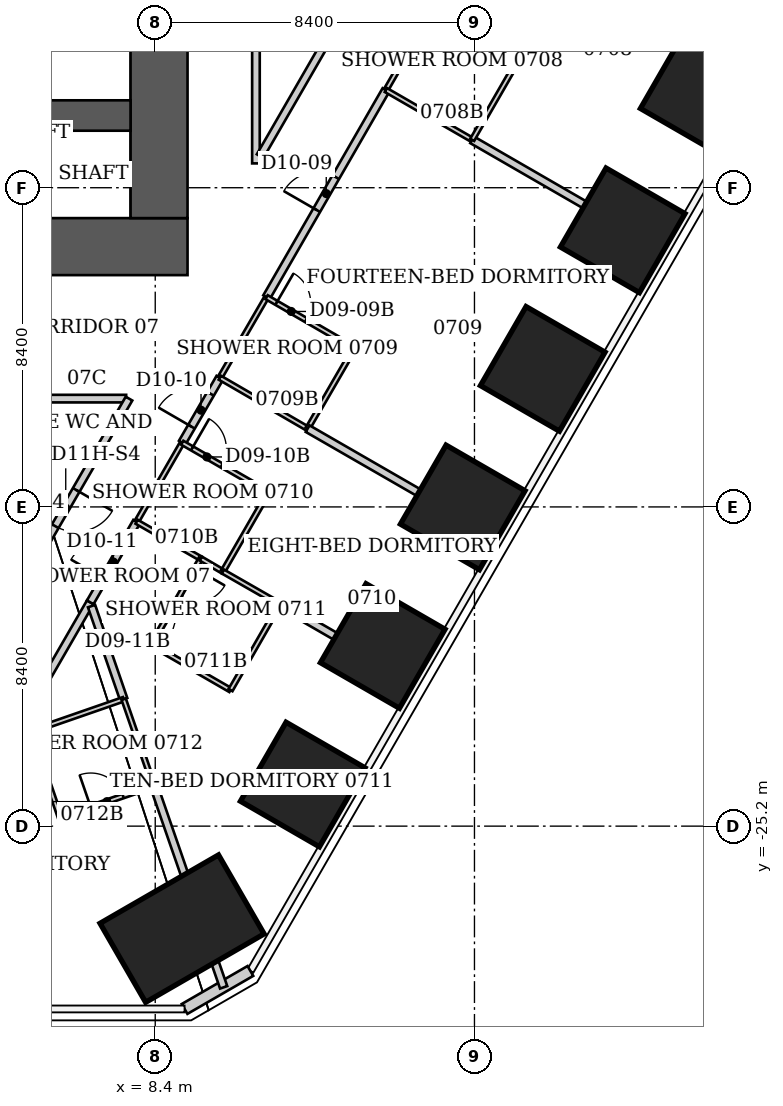
"""IFC4 building model, lengths in metres.
Left out: names, types, materials, properties, quantities, classifications, styles, units other than length and angle.
Written with IfcOpenShell. Run it as: python <this file> out.ifc"""

import sys

from ifc_helpers import new_model, si_unit, direction, frame, frame_2d, origin, origin_2d, place, context, subcontext, project, spatial, rectangle, extrude, element, fill, save


model = new_model("IFC4")
c1 = context("Model", 3, precision=1e-05, world=origin(), true_north=direction((0.0, 1.0)))
c2 = subcontext(c1, "Body", "Model", "MODEL_VIEW")
j1 = project(units=[si_unit("LENGTHUNIT", "METRE"), si_unit("PLANEANGLEUNIT", "RADIAN")], contexts=[c1])
p1 = place(None, origin())
s1 = spatial("IfcSite", under=j1, at=p1, CompositionType="ELEMENT")
p2 = place(p1, origin())
s2 = spatial("IfcBuilding", under=s1, at=p2, CompositionType="ELEMENT")
p3 = place(p2, frame((0.0, 0.0, 34.4)))
s3 = spatial("IfcBuildingStorey", under=s2, at=p3, CompositionType="ELEMENT", Elevation=34.4)
for number, where, z_axis, x_axis in (
    (1, (22.806, -5.875, 0.0), (0.0, 0.0, 1.0), (0.866, -0.5, 0.0)),
    (2, (20.701, -9.521, 0.0), (0.0, 0.0, 1.0), (0.866, -0.5, 0.0)),
    (3, (18.596, -13.167, 0.0), (0.0, 0.0, 1.0), (0.866, -0.5, 0.0)),
    (4, (16.491, -16.813, 0.0), (0.0, 0.0, 1.0), (0.866, -0.5, 0.0)),
    (5, (14.387, -20.459, 0.0), (0.0, 0.0, 1.0), (0.866, -0.5, 0.0)),
    (6, (12.282, -24.105, 0.0), (0.0, 0.0, 1.0), (0.866, -0.5, 0.0)),
):
    element("IfcColumn", number, at=place(p3, frame(where, z_axis=z_axis, x_axis=x_axis)), inside=s3, PredefinedType="COLUMN", context=c2, shape_type="SweptSolid", body=[
        extrude(rectangle(XDim=2.4, YDim=2.4, at=origin_2d()), origin(), (0.0, 0.0, 1.0), 3.8),
    ])
p4 = place(p3, frame((9.106, -27.897, 0.0), z_axis=(0.0, 0.0, 1.0), x_axis=(0.5, -0.866025403784, 0.0)))
e7 = element("IfcColumn", 7, at=p4, inside=s3, PredefinedType="COLUMN", context=c2, shape_type="SweptSolid", body=[
    extrude(rectangle(XDim=2.4, YDim=3.6, at=origin_2d()), origin(), (0.0, 0.0, 1.0), 3.8),
])
p5 = place(p3, frame((-9.25, -9.95, 0.0), z_axis=(0.0, 0.0, 1.0), x_axis=(1.0, 0.0, 0.0)))
e8 = element("IfcWall", 8, at=p5, inside=s3, PredefinedType="SHEAR", context=c2, shape_type="SweptSolid", body=[
    extrude(rectangle(XDim=18.5, YDim=1.5, at=frame_2d((9.25, 0.0))), origin(), (0.0, 0.0, 1.0), 3.8),
])
p6 = place(p5, frame((2.137, 0.0, 0.0)))
e9 = element("IfcOpeningElement", 9, at=p6, cuts=e8, PredefinedType="OPENING", context=c2, shape_type="SweptSolid", body=[
    extrude(rectangle(XDim=1.1, YDim=2.1, at=frame_2d((0.55, 1.05))), frame((0.0, 0.75, 0.0), z_axis=(0.0, -1.0, 0.0), x_axis=(1.0, 0.0, 0.0)), (0.0, 0.0, 1.0), 1.5),
])
p7 = place(p5, frame((4.762, 0.0, 0.0)))
e10 = element("IfcOpeningElement", 10, at=p7, cuts=e8, PredefinedType="OPENING", context=c2, shape_type="SweptSolid", body=[
    extrude(rectangle(XDim=1.1, YDim=2.1, at=frame_2d((0.55, 1.05))), frame((0.0, 0.75, 0.0), z_axis=(0.0, -1.0, 0.0), x_axis=(1.0, 0.0, 0.0)), (0.0, 0.0, 1.0), 1.5),
])
p8 = place(p5, frame((7.387, 0.0, 0.0)))
e11 = element("IfcOpeningElement", 11, at=p8, cuts=e8, PredefinedType="OPENING", context=c2, shape_type="SweptSolid", body=[
    extrude(rectangle(XDim=1.1, YDim=2.1, at=frame_2d((0.55, 1.05))), frame((0.0, 0.75, 0.0), z_axis=(0.0, -1.0, 0.0), x_axis=(1.0, 0.0, 0.0)), (0.0, 0.0, 1.0), 1.5),
])
p9 = place(p3, frame((8.5, -9.2, 0.0), z_axis=(0.0, 0.0, 1.0), x_axis=(0.0, 1.0, 0.0)))
e12 = element("IfcWall", 12, at=p9, inside=s3, PredefinedType="SHEAR", context=c2, shape_type="SweptSolid", body=[
    extrude(rectangle(XDim=15.3, YDim=1.5, at=frame_2d((7.65, 0.0))), origin(), (0.0, 0.0, 1.0), 3.8),
])
p10 = place(p9, frame((10.7, 0.0, 0.0)))
e13 = element("IfcOpeningElement", 13, at=p10, cuts=e12, PredefinedType="OPENING", context=c2, shape_type="SweptSolid", body=[
    extrude(rectangle(XDim=1.2, YDim=2.2, at=frame_2d((0.6, 1.1))), frame((0.0, 0.75, 0.0), z_axis=(0.0, -1.0, 0.0), x_axis=(1.0, 0.0, 0.0)), (0.0, 0.0, 1.0), 1.5),
])
p11 = place(p3, frame((-7.75, -6.5, 0.0), z_axis=(0.0, 0.0, 1.0), x_axis=(1.0, 0.0, 0.0)))
e14 = element("IfcWall", 14, at=p11, inside=s3, PredefinedType="SHEAR", context=c2, shape_type="SweptSolid", body=[
    extrude(rectangle(XDim=15.5, YDim=0.8, at=frame_2d((7.75, 0.0))), origin(), (0.0, 0.0, 1.0), 3.8),
])
p12 = place(p3, frame((10.904, -29.011, 0.0), z_axis=(0.0, 0.0, 1.0), x_axis=(-0.866010750942, -0.50002537861, 0.0)))
e15 = element("IfcWall", 15, at=p12, inside=s3, PredefinedType="SOLIDWALL", context=c2, shape_type="SweptSolid", body=[
    extrude(rectangle(XDim=2.0, YDim=0.3, at=frame_2d((1.0, 0.0))), origin(), (0.0, 0.0, 1.0), 3.64),
])
p13 = place(p3, frame((4.0, -13.95, 0.0), z_axis=(0.0, 0.0, 1.0), x_axis=(1.0, 0.0, 0.0)))
e16 = element("IfcWall", 16, at=p13, inside=s3, PredefinedType="PARTITIONING", context=c2, shape_type="SweptSolid", body=[
    extrude(rectangle(XDim=3.635, YDim=0.2, at=frame_2d((1.817, 0.0))), origin(), (0.0, 0.0, 1.0), 3.64),
])
p14 = place(p3, frame((5.12, -22.71, 0.0), z_axis=(0.0, 0.0, 1.0), x_axis=(0.324880771143, -0.945754981241, 0.0)))
e17 = element("IfcWall", 17, at=p14, inside=s3, PredefinedType="PARTITIONING", context=c2, shape_type="SweptSolid", body=[
    extrude(rectangle(XDim=2.4, YDim=0.12, at=frame_2d((1.2, 0.0))), origin(), (0.0, 0.0, 1.0), 3.64),
])
p15 = place(p3, frame((5.42, -21.51, 0.0), z_axis=(0.0, 0.0, 1.0), x_axis=(0.499963722229, 0.866046347752, 0.0)))
e18 = element("IfcWall", 18, at=p15, inside=s3, PredefinedType="PARTITIONING", context=c2, shape_type="SweptSolid", body=[
    extrude(rectangle(XDim=2.54, YDim=0.2, at=frame_2d((1.27, 0.0))), origin(), (0.0, 0.0, 1.0), 3.64),
])
p16 = place(p3, frame((5.9, -24.98, 0.0), z_axis=(0.0, 0.0, 1.0), x_axis=(0.945165466094, 0.326591857987, 0.0)))
e19 = element("IfcWall", 19, at=p16, inside=s3, PredefinedType="PARTITIONING", context=c2, shape_type="SweptSolid", body=[
    extrude(rectangle(XDim=2.603, YDim=0.12, at=frame_2d((1.302, 0.0))), origin(), (0.0, 0.0, 1.0), 3.64),
])
p17 = place(p16, frame((0.85, 0.0, 0.0)))
e20 = element("IfcOpeningElement", 20, at=p17, cuts=e19, PredefinedType="OPENING", context=c2, shape_type="SweptSolid", body=[
    extrude(rectangle(XDim=0.9, YDim=2.03, at=frame_2d((0.45, 1.015))), frame((0.0, 0.06, 0.0), z_axis=(0.0, -1.0, 0.0), x_axis=(1.0, 0.0, 0.0)), (0.0, 0.0, 1.0), 0.12),
])
p18 = place(p3, frame((6.69, -19.31, 0.0), z_axis=(0.0, 0.0, 1.0), x_axis=(0.498748634132, 0.866746675766, 0.0)))
e21 = element("IfcWall", 21, at=p18, inside=s3, PredefinedType="PARTITIONING", context=c2, shape_type="SweptSolid", body=[
    extrude(rectangle(XDim=2.446, YDim=0.2, at=frame_2d((1.223, 0.0))), origin(), (0.0, 0.0, 1.0), 3.64),
])
p19 = place(p18, frame((0.723, 0.0, 0.0)))
e22 = element("IfcOpeningElement", 22, at=p19, cuts=e21, PredefinedType="OPENING", context=c2, shape_type="SweptSolid", body=[
    extrude(rectangle(XDim=1.0, YDim=2.13, at=frame_2d((0.5, 1.065))), frame((0.0, 0.1, 0.0), z_axis=(0.0, -1.0, 0.0), x_axis=(1.0, 0.0, 0.0)), (0.0, 0.0, 1.0), 0.2),
])
p20 = place(p3, frame((6.724, -19.409, 0.0), z_axis=(0.0, 0.0, 1.0), x_axis=(0.326182205696, -0.945306917719, 0.0)))
e23 = element("IfcWall", 23, at=p20, inside=s3, PredefinedType="PARTITIONING", context=c2, shape_type="SweptSolid", body=[
    extrude(rectangle(XDim=2.593, YDim=0.2, at=frame_2d((1.296, 0.0))), origin(), (0.0, 0.0, 1.0), 3.64),
])
p21 = place(p3, frame((7.57, -21.86, 0.0), z_axis=(0.0, 0.0, 1.0), x_axis=(-0.944782191137, -0.327698964463, 0.0)))
e24 = element("IfcWall", 24, at=p21, inside=s3, PredefinedType="PARTITIONING", context=c2, shape_type="SweptSolid", body=[
    extrude(rectangle(XDim=2.594, YDim=0.12, at=frame_2d((1.297, 0.0))), origin(), (0.0, 0.0, 1.0), 3.64),
])
p22 = place(p3, frame((7.57, -21.86, 0.0), z_axis=(0.0, 0.0, 1.0), x_axis=(0.327706459026, -0.944779591605, 0.0)))
e25 = element("IfcWall", 25, at=p22, inside=s3, PredefinedType="PARTITIONING", context=c2, shape_type="SweptSolid", body=[
    extrude(rectangle(XDim=2.35, YDim=0.12, at=frame_2d((1.175, 0.0))), origin(), (0.0, 0.0, 1.0), 3.64),
])
p23 = place(p3, frame((7.71, -13.95, 0.0), z_axis=(0.0, 0.0, 1.0), x_axis=(-0.500511113963, -0.865730110831, 0.0)))
e26 = element("IfcWall", 26, at=p23, inside=s3, PredefinedType="PARTITIONING", context=c2, shape_type="SweptSolid", body=[
    extrude(rectangle(XDim=6.653, YDim=0.2, at=frame_2d((3.327, 0.0))), origin(), (0.0, 0.0, 1.0), 3.64),
])
p24 = place(p23, frame((2.777, 0.0, 0.0)))
e27 = element("IfcOpeningElement", 27, at=p24, cuts=e26, PredefinedType="OPENING", context=c2, shape_type="SweptSolid", body=[
    extrude(rectangle(XDim=1.1, YDim=2.2, at=frame_2d((0.55, 1.1))), frame((0.0, 0.1, 0.0), z_axis=(0.0, -1.0, 0.0), x_axis=(1.0, 0.0, 0.0)), (0.0, 0.0, 1.0), 0.2),
])
p25 = place(p3, frame((7.91, -17.19, 0.0), z_axis=(0.0, 0.0, 1.0), x_axis=(0.499737123639, 0.866177122335, 0.0)))
e28 = element("IfcWall", 28, at=p25, inside=s3, PredefinedType="PARTITIONING", context=c2, shape_type="SweptSolid", body=[
    extrude(rectangle(XDim=2.401, YDim=0.12, at=frame_2d((1.201, 0.0))), origin(), (0.0, 0.0, 1.0), 3.64),
])
p26 = place(p3, frame((7.91, -17.19, 0.0), z_axis=(0.0, 0.0, 1.0), x_axis=(0.8673242112, -0.497743621421, 0.0)))
e29 = element("IfcWall", 29, at=p26, inside=s3, PredefinedType="PARTITIONING", context=c2, shape_type="SweptSolid", body=[
    extrude(rectangle(XDim=1.949, YDim=0.12, at=frame_2d((0.974, 0.0))), origin(), (0.0, 0.0, 1.0), 3.64),
])
p27 = place(p3, frame((8.3, -20.42, 0.0), z_axis=(0.0, 0.0, 1.0), x_axis=(0.866177122335, -0.499737123639, 0.0)))
e30 = element("IfcWall", 30, at=p27, inside=s3, PredefinedType="PARTITIONING", context=c2, shape_type="SweptSolid", body=[
    extrude(rectangle(XDim=2.401, YDim=0.12, at=frame_2d((1.201, 0.0))), origin(), (0.0, 0.0, 1.0), 3.64),
])
p28 = place(p3, frame((8.36, -24.13, 0.0), z_axis=(0.0, 0.0, 1.0), x_axis=(0.327332811485, -0.944909112309, 0.0)))
e31 = element("IfcWall", 31, at=p28, inside=s3, PredefinedType="PARTITIONING", context=c2, shape_type="SweptSolid", body=[
    extrude(rectangle(XDim=5.621, YDim=0.2, at=frame_2d((2.811, 0.0))), origin(), (0.0, 0.0, 1.0), 3.64),
])
p29 = place(p3, frame((9.11, -15.11, 0.0), z_axis=(0.0, 0.0, 1.0), x_axis=(0.500987568213, 0.865454479737, 0.0)))
e32 = element("IfcWall", 32, at=p29, inside=s3, PredefinedType="PARTITIONING", context=c2, shape_type="SweptSolid", body=[
    extrude(rectangle(XDim=1.976, YDim=0.2, at=frame_2d((0.988, 0.0))), origin(), (0.0, 0.0, 1.0), 3.64),
])
p30 = place(p29, frame((0.488, 0.0, 0.0)))
e33 = element("IfcOpeningElement", 33, at=p30, cuts=e32, PredefinedType="OPENING", context=c2, shape_type="SweptSolid", body=[
    extrude(rectangle(XDim=1.0, YDim=2.13, at=frame_2d((0.5, 1.065))), frame((0.0, 0.1, 0.0), z_axis=(0.0, -1.0, 0.0), x_axis=(1.0, 0.0, 0.0)), (0.0, 0.0, 1.0), 0.2),
])
p31 = place(p3, frame((9.6, -18.16, 0.0), z_axis=(0.0, 0.0, 1.0), x_axis=(-0.498627694264, -0.866816256489, 0.0)))
e34 = element("IfcWall", 34, at=p31, inside=s3, PredefinedType="PARTITIONING", context=c2, shape_type="SweptSolid", body=[
    extrude(rectangle(XDim=2.607, YDim=0.12, at=frame_2d((1.304, 0.0))), origin(), (0.0, 0.0, 1.0), 3.64),
])
p32 = place(p31, frame((0.3, 0.0, 0.0)))
e35 = element("IfcOpeningElement", 35, at=p32, cuts=e34, PredefinedType="OPENING", context=c2, shape_type="SweptSolid", body=[
    extrude(rectangle(XDim=0.9, YDim=2.03, at=frame_2d((0.45, 1.015))), frame((0.0, 0.06, 0.0), z_axis=(0.0, -1.0, 0.0), x_axis=(1.0, 0.0, 0.0)), (0.0, 0.0, 1.0), 0.12),
])
p33 = place(p3, frame((9.6, -18.16, 0.0), z_axis=(0.0, 0.0, 1.0), x_axis=(0.862577739272, -0.505924543497, 0.0)))
e36 = element("IfcWall", 36, at=p33, inside=s3, PredefinedType="PARTITIONING", context=c2, shape_type="SweptSolid", body=[
    extrude(rectangle(XDim=0.672, YDim=0.12, at=frame_2d((0.336, 0.0))), origin(), (0.0, 0.0, 1.0), 3.64),
])
p34 = place(p3, frame((10.1, -13.4, 0.0), z_axis=(0.0, 0.0, 1.0), x_axis=(0.501856726365, 0.86495076519, 0.0)))
e37 = element("IfcWall", 37, at=p34, inside=s3, PredefinedType="PARTITIONING", context=c2, shape_type="SweptSolid", body=[
    extrude(rectangle(XDim=2.451, YDim=0.12, at=frame_2d((1.226, 0.0))), origin(), (0.0, 0.0, 1.0), 3.64),
])
p35 = place(p3, frame((10.1, -13.4, 0.0), z_axis=(0.0, 0.0, 1.0), x_axis=(0.864966903181, -0.501828911485, 0.0)))
e38 = element("IfcWall", 38, at=p35, inside=s3, PredefinedType="PARTITIONING", context=c2, shape_type="SweptSolid", body=[
    extrude(rectangle(XDim=2.67, YDim=0.12, at=frame_2d((1.335, 0.0))), origin(), (0.0, 0.0, 1.0), 3.64),
])
p36 = place(p3, frame((10.18, -18.5, 0.0), z_axis=(0.0, 0.0, 1.0), x_axis=(0.499693115345, 0.866202511239, 0.0)))
e39 = element("IfcWall", 39, at=p36, inside=s3, PredefinedType="PARTITIONING", context=c2, shape_type="SweptSolid", body=[
    extrude(rectangle(XDim=2.401, YDim=0.12, at=frame_2d((1.201, 0.0))), origin(), (0.0, 0.0, 1.0), 3.64),
])
p37 = place(p3, frame((10.18, -18.5, 0.0), z_axis=(0.0, 0.0, 1.0), x_axis=(0.867564547129, -0.497324598794, 0.0)))
e40 = element("IfcWall", 40, at=p37, inside=s3, PredefinedType="PARTITIONING", context=c2, shape_type="SweptSolid", body=[
    extrude(rectangle(XDim=1.729, YDim=0.12, at=frame_2d((0.865, 0.0))), origin(), (0.0, 0.0, 1.0), 3.64),
])
p38 = place(p3, frame((10.38, -21.62, 0.0), z_axis=(0.0, 0.0, 1.0), x_axis=(0.498627694264, 0.866816256489, 0.0)))
e41 = element("IfcWall", 41, at=p38, inside=s3, PredefinedType="PARTITIONING", context=c2, shape_type="SweptSolid", body=[
    extrude(rectangle(XDim=2.607, YDim=0.12, at=frame_2d((1.304, 0.0))), origin(), (0.0, 0.0, 1.0), 3.64),
])
p39 = place(p3, frame((11.05, -7.76, 0.0), z_axis=(0.0, 0.0, 1.0), x_axis=(0.0, 1.0, 0.0)))
e42 = element("IfcWall", 42, at=p39, inside=s3, PredefinedType="PARTITIONING", context=c2, shape_type="SweptSolid", body=[
    extrude(rectangle(XDim=17.16, YDim=0.2, at=frame_2d((8.58, 0.0))), origin(), (0.0, 0.0, 1.0), 3.64),
])
p40 = place(p39, frame((8.03, 0.0, 0.0)))
e43 = element("IfcOpeningElement", 43, at=p40, cuts=e42, PredefinedType="OPENING", context=c2, shape_type="SweptSolid", body=[
    extrude(rectangle(XDim=1.1, YDim=2.2, at=frame_2d((0.55, 1.1))), frame((0.0, 0.1, 0.0), z_axis=(0.0, -1.0, 0.0), x_axis=(1.0, 0.0, 0.0)), (0.0, 0.0, 1.0), 0.2),
])
p41 = place(p3, frame((11.33, -11.28, 0.0), z_axis=(0.0, 0.0, 1.0), x_axis=(0.499208241022, 0.866482043724, 0.0)))
e44 = element("IfcWall", 44, at=p41, inside=s3, PredefinedType="PARTITIONING", context=c2, shape_type="SweptSolid", body=[
    extrude(rectangle(XDim=6.29, YDim=0.2, at=frame_2d((3.145, 0.0))), origin(), (0.0, 0.0, 1.0), 3.64),
])
p42 = place(p41, frame((2.645, 0.0, 0.0)))
e45 = element("IfcOpeningElement", 45, at=p42, cuts=e44, PredefinedType="OPENING", context=c2, shape_type="SweptSolid", body=[
    extrude(rectangle(XDim=1.0, YDim=2.13, at=frame_2d((0.5, 1.065))), frame((0.0, 0.1, 0.0), z_axis=(0.0, -1.0, 0.0), x_axis=(1.0, 0.0, 0.0)), (0.0, 0.0, 1.0), 0.2),
])
p43 = place(p3, frame((11.38, -16.42, 0.0), z_axis=(0.0, 0.0, 1.0), x_axis=(-0.866154567199, 0.49977621564, 0.0)))
e46 = element("IfcWall", 46, at=p43, inside=s3, PredefinedType="PARTITIONING", context=c2, shape_type="SweptSolid", body=[
    extrude(rectangle(XDim=2.621, YDim=0.12, at=frame_2d((1.311, 0.0))), origin(), (0.0, 0.0, 1.0), 2.878),
])
p44 = place(p43, frame((1.421, 0.0, 0.0)))
e47 = element("IfcOpeningElement", 47, at=p44, cuts=e46, PredefinedType="OPENING", context=c2, shape_type="SweptSolid", body=[
    extrude(rectangle(XDim=0.9, YDim=2.03, at=frame_2d((0.45, 1.015))), frame((0.0, 0.06, 0.0), z_axis=(0.0, -1.0, 0.0), x_axis=(1.0, 0.0, 0.0)), (0.0, 0.0, 1.0), 0.12),
])
p45 = place(p3, frame((11.68, -19.36, 0.0), z_axis=(0.0, 0.0, 1.0), x_axis=(0.865885444553, -0.500242338183, 0.0)))
e48 = element("IfcWall", 48, at=p45, inside=s3, PredefinedType="PARTITIONING", context=c2, shape_type="SweptSolid", body=[
    extrude(rectangle(XDim=4.038, YDim=0.2, at=frame_2d((2.019, 0.0))), origin(), (0.0, 0.0, 1.0), 3.64),
])
p46 = place(p3, frame((12.41, -14.74, 0.0), z_axis=(0.0, 0.0, 1.0), x_axis=(0.501813488763, 0.864975850817, 0.0)))
e49 = element("IfcWall", 49, at=p46, inside=s3, PredefinedType="PARTITIONING", context=c2, shape_type="SweptSolid", body=[
    extrude(rectangle(XDim=2.451, YDim=0.12, at=frame_2d((1.226, 0.0))), origin(), (0.0, 0.0, 1.0), 3.64),
])
p47 = place(p3, frame((13.64, -12.62, 0.0), z_axis=(0.0, 0.0, 1.0), x_axis=(-0.864966903181, 0.501828911485, 0.0)))
e50 = element("IfcWall", 50, at=p47, inside=s3, PredefinedType="PARTITIONING", context=c2, shape_type="SweptSolid", body=[
    extrude(rectangle(XDim=2.67, YDim=0.12, at=frame_2d((1.335, 0.0))), origin(), (0.0, 0.0, 1.0), 3.64),
])
p48 = place(p47, frame((1.47, 0.0, 0.0)))
e51 = element("IfcOpeningElement", 51, at=p48, cuts=e50, PredefinedType="OPENING", context=c2, shape_type="SweptSolid", body=[
    extrude(rectangle(XDim=0.9, YDim=2.03, at=frame_2d((0.45, 1.015))), frame((0.0, 0.06, 0.0), z_axis=(0.0, -1.0, 0.0), x_axis=(1.0, 0.0, 0.0)), (0.0, 0.0, 1.0), 0.12),
])
p49 = place(p3, frame((14.47, -5.83, 0.0), z_axis=(0.0, 0.0, 1.0), x_axis=(0.499693115345, 0.866202511239, 0.0)))
e52 = element("IfcWall", 52, at=p49, inside=s3, PredefinedType="PARTITIONING", context=c2, shape_type="SweptSolid", body=[
    extrude(rectangle(XDim=2.401, YDim=0.12, at=frame_2d((1.201, 0.0))), origin(), (0.0, 0.0, 1.0), 3.64),
])
p50 = place(p3, frame((14.47, -5.83, 0.0), z_axis=(0.0, 0.0, 1.0), x_axis=(0.866010296064, -0.500026166427, 0.0)))
e53 = element("IfcWall", 53, at=p50, inside=s3, PredefinedType="PARTITIONING", context=c2, shape_type="SweptSolid", body=[
    extrude(rectangle(XDim=2.621, YDim=0.12, at=frame_2d((1.311, 0.0))), origin(), (0.0, 0.0, 1.0), 3.023),
])
p51 = place(p3, frame((16.74, -7.141, 0.0), z_axis=(0.0, 0.0, 1.0), x_axis=(0.865985044037, -0.500069898618, 0.0)))
e54 = element("IfcWall", 54, at=p51, inside=s3, PredefinedType="PARTITIONING", context=c2, shape_type="SweptSolid", body=[
    extrude(rectangle(XDim=5.758, YDim=0.2, at=frame_2d((2.879, 0.0))), origin(), (0.0, 0.0, 1.0), 3.023),
])
p52 = place(p3, frame((16.74, -7.14, 0.0), z_axis=(0.0, 0.0, 1.0), x_axis=(0.499737123639, 0.866177122335, 0.0)))
e55 = element("IfcWall", 55, at=p52, inside=s3, PredefinedType="PARTITIONING", context=c2, shape_type="SweptSolid", body=[
    extrude(rectangle(XDim=2.401, YDim=0.12, at=frame_2d((1.201, 0.0))), origin(), (0.0, 0.0, 1.0), 3.64),
])
p53 = place(p3, frame((17.356, -17.59, 0.0), z_axis=(0.0, 0.0, 1.0), x_axis=(-0.866442508333, 0.499276856818, 0.0)))
e56 = element("IfcWall", 56, at=p53, inside=s3, PredefinedType="PARTITIONING", context=c2, shape_type="SweptSolid", body=[
    extrude(rectangle(XDim=5.708, YDim=0.2, at=frame_2d((2.854, 0.0))), origin(), (0.0, 0.0, 1.0), 3.64),
])
p54 = place(p3, frame((17.94, -5.06, 0.0), z_axis=(0.0, 0.0, 1.0), x_axis=(-0.866114241029, 0.499846097802, 0.0)))
e57 = element("IfcWall", 57, at=p54, inside=s3, PredefinedType="PARTITIONING", context=c2, shape_type="SweptSolid", body=[
    extrude(rectangle(XDim=2.621, YDim=0.12, at=frame_2d((1.311, 0.0))), origin(), (0.0, 0.0, 1.0), 3.64),
])
p55 = place(p54, frame((1.421, 0.0, 0.0)))
e58 = element("IfcOpeningElement", 58, at=p55, cuts=e57, PredefinedType="OPENING", context=c2, shape_type="SweptSolid", body=[
    extrude(rectangle(XDim=0.9, YDim=2.03, at=frame_2d((0.45, 1.015))), frame((0.0, 0.06, 0.0), z_axis=(0.0, -1.0, 0.0), x_axis=(1.0, 0.0, 0.0)), (0.0, 0.0, 1.0), 0.12),
])
p56 = place(p3, frame((19.03, 6.06, 0.0), z_axis=(0.0, 0.0, 1.0), x_axis=(-0.500049636372, -0.865996744315, 0.0)))
e59 = element("IfcWall", 59, at=p56, inside=s3, PredefinedType="PARTITIONING", context=c2, shape_type="SweptSolid", body=[
    extrude(rectangle(XDim=15.739, YDim=0.2, at=frame_2d((7.869, 0.0))), origin(), (0.0, 0.0, 1.0), 3.64),
])
p57 = place(p42, origin())
e60 = element("IfcDoor", 60, at=p57, inside=s3, OperationType="SINGLE_SWING_LEFT", PredefinedType="DOOR", context=c2, shape_type="SweptSolid", body=[
    extrude(rectangle(XDim=1.0, YDim=2.13, at=frame_2d((0.5, 1.065))), frame((0.0, 0.025, 0.0), z_axis=(0.0, -1.0, 0.0), x_axis=(1.0, 0.0, 0.0)), (0.0, 0.0, 1.0), 0.05),
])
fill(e45, e60)
p58 = place(p48, origin())
e61 = element("IfcDoor", 61, at=p58, inside=s3, OperationType="SINGLE_SWING_RIGHT", PredefinedType="DOOR", context=c2, shape_type="SweptSolid", body=[
    extrude(rectangle(XDim=0.9, YDim=2.03, at=frame_2d((0.45, 1.015))), frame((0.0, 0.025, 0.0), z_axis=(0.0, -1.0, 0.0), x_axis=(1.0, 0.0, 0.0)), (0.0, 0.0, 1.0), 0.05),
])
fill(e51, e61)
p59 = place(p30, origin())
e62 = element("IfcDoor", 62, at=p59, inside=s3, OperationType="SINGLE_SWING_LEFT", PredefinedType="DOOR", context=c2, shape_type="SweptSolid", body=[
    extrude(rectangle(XDim=1.0, YDim=2.13, at=frame_2d((0.5, 1.065))), frame((0.0, 0.025, 0.0), z_axis=(0.0, -1.0, 0.0), x_axis=(1.0, 0.0, 0.0)), (0.0, 0.0, 1.0), 0.05),
])
fill(e33, e62)
p60 = place(p44, origin())
e63 = element("IfcDoor", 63, at=p60, inside=s3, OperationType="SINGLE_SWING_RIGHT", PredefinedType="DOOR", context=c2, shape_type="SweptSolid", body=[
    extrude(rectangle(XDim=0.9, YDim=2.03, at=frame_2d((0.45, 1.015))), frame((0.0, 0.025, 0.0), z_axis=(0.0, -1.0, 0.0), x_axis=(1.0, 0.0, 0.0)), (0.0, 0.0, 1.0), 0.05),
])
fill(e47, e63)
p61 = place(p19, origin())
e64 = element("IfcDoor", 64, at=p61, inside=s3, OperationType="SINGLE_SWING_LEFT", PredefinedType="DOOR", context=c2, shape_type="SweptSolid", body=[
    extrude(rectangle(XDim=1.0, YDim=2.13, at=frame_2d((0.5, 1.065))), frame((0.0, 0.025, 0.0), z_axis=(0.0, -1.0, 0.0), x_axis=(1.0, 0.0, 0.0)), (0.0, 0.0, 1.0), 0.05),
])
fill(e22, e64)
p62 = place(p32, origin())
e65 = element("IfcDoor", 65, at=p62, inside=s3, OperationType="SINGLE_SWING_LEFT", PredefinedType="DOOR", context=c2, shape_type="SweptSolid", body=[
    extrude(rectangle(XDim=0.9, YDim=2.03, at=frame_2d((0.45, 1.015))), frame((0.0, 0.025, 0.0), z_axis=(0.0, -1.0, 0.0), x_axis=(1.0, 0.0, 0.0)), (0.0, 0.0, 1.0), 0.05),
])
fill(e35, e65)
p63 = place(p17, origin())
e66 = element("IfcDoor", 66, at=p63, inside=s3, OperationType="SINGLE_SWING_LEFT", PredefinedType="DOOR", context=c2, shape_type="SweptSolid", body=[
    extrude(rectangle(XDim=0.9, YDim=2.03, at=frame_2d((0.45, 1.015))), frame((0.0, 0.025, 0.0), z_axis=(0.0, -1.0, 0.0), x_axis=(1.0, 0.0, 0.0)), (0.0, 0.0, 1.0), 0.05),
])
fill(e20, e66)
p64 = place(p24, origin())
e67 = element("IfcDoor", 67, at=p64, inside=s3, OperationType="SINGLE_SWING_LEFT", PredefinedType="DOOR", context=c2, shape_type="SweptSolid", body=[
    extrude(rectangle(XDim=1.1, YDim=2.2, at=frame_2d((0.55, 1.1))), frame((0.0, 0.025, 0.0), z_axis=(0.0, -1.0, 0.0), x_axis=(1.0, 0.0, 0.0)), (0.0, 0.0, 1.0), 0.05),
])
fill(e27, e67)
save(model, sys.argv[1])
